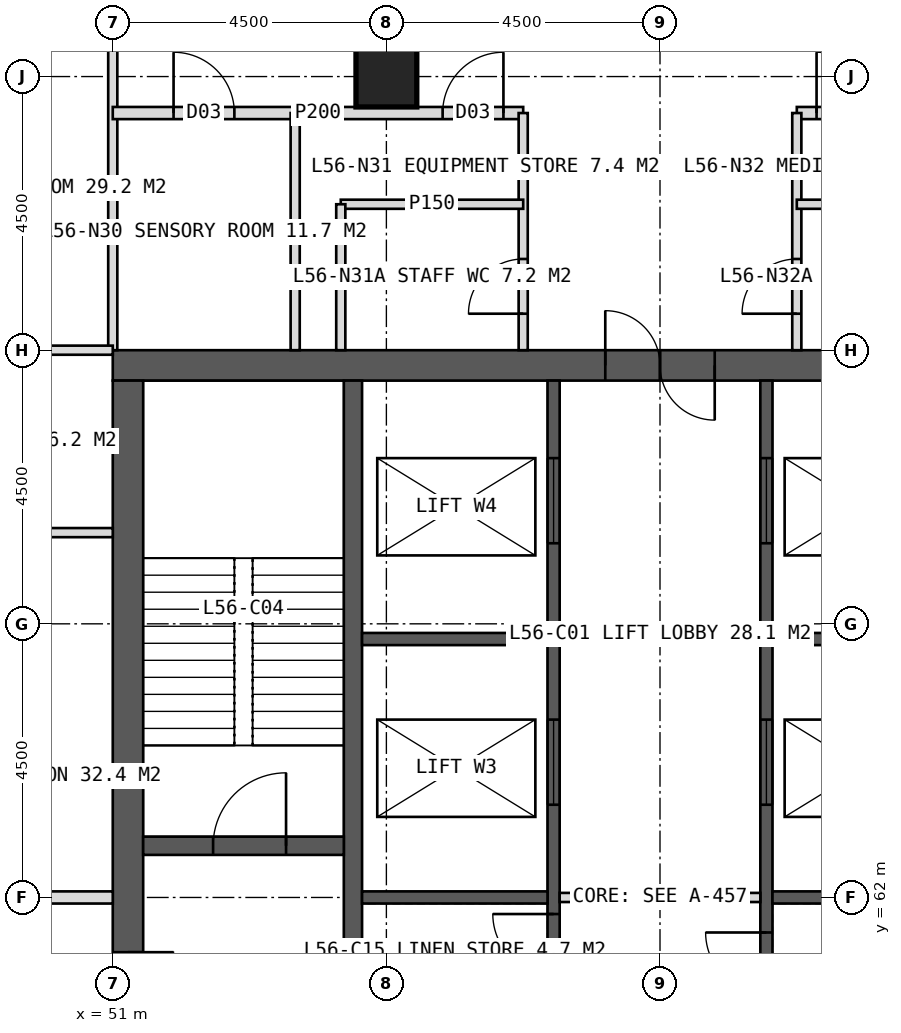
"""IFC4 building model, lengths in metres.
Left out: names, types, materials, properties, quantities, classifications, styles, units other than length and angle.
Written with IfcOpenShell. Run it as: python <this file> out.ifc"""

import sys

from ifc_helpers import new_model, si_unit, direction, frame, frame_2d, origin, origin_2d, place, context, subcontext, project, spatial, rectangle, hollow_rectangle, extrude, element, fill, save


model = new_model("IFC4")
c1 = context("Model", 3, precision=1e-05, world=origin(), true_north=direction((0.0, 1.0)))
c2 = subcontext(c1, "Body", "Model", "MODEL_VIEW")
j1 = project(units=[si_unit("LENGTHUNIT", "METRE"), si_unit("PLANEANGLEUNIT", "RADIAN")], contexts=[c1])
p1 = place(None, origin())
s1 = spatial("IfcSite", under=j1, at=p1, CompositionType="ELEMENT")
p2 = place(p1, origin())
s2 = spatial("IfcBuilding", under=s1, at=p2, CompositionType="ELEMENT")
p3 = place(p2, frame((0.0, 0.0, 233.0)))
s3 = spatial("IfcBuildingStorey", under=s2, at=p3, CompositionType="ELEMENT", Elevation=233.0)
p4 = place(p3, frame((51.0, 70.75, 0.0), z_axis=(0.0, 0.0, 1.0), x_axis=(1.0, 0.0, 0.0)))
e1 = element("IfcWall", 1, at=p4, inside=s3, PredefinedType="SHEAR", context=c2, shape_type="SweptSolid", body=[
    extrude(rectangle(XDim=18.0, YDim=0.5, at=frame_2d((9.0, 0.0))), origin(), (0.0, 0.0, 1.0), 4.0),
])
p5 = place(p4, frame((8.1, 0.0, 0.0)))
e2 = element("IfcOpeningElement", 2, at=p5, cuts=e1, PredefinedType="OPENING", context=c2, shape_type="SweptSolid", body=[
    extrude(rectangle(XDim=1.8, YDim=2.2, at=frame_2d((0.9, 1.1))), frame((0.0, 0.26, 0.0), z_axis=(0.0, -1.0, 0.0), x_axis=(1.0, 0.0, 0.0)), (0.0, 0.0, 1.0), 0.52),
])
p6 = place(p3, frame((51.25, 53.5, 0.0), z_axis=(0.0, 0.0, 1.0), x_axis=(0.0, 1.0, 0.0)))
e3 = element("IfcWall", 3, at=p6, inside=s3, PredefinedType="SHEAR", context=c2, shape_type="SweptSolid", body=[
    extrude(rectangle(XDim=17.0, YDim=0.5, at=frame_2d((8.5, 0.0))), origin(), (0.0, 0.0, 1.0), 4.0),
])
p7 = place(p6, frame((6.1, 0.0, 0.0)))
e4 = element("IfcOpeningElement", 4, at=p7, cuts=e3, PredefinedType="OPENING", context=c2, shape_type="SweptSolid", body=[
    extrude(rectangle(XDim=1.5, YDim=2.2, at=frame_2d((0.75, 1.1))), frame((0.0, 0.26, 0.0), z_axis=(0.0, -1.0, 0.0), x_axis=(1.0, 0.0, 0.0)), (0.0, 0.0, 1.0), 0.52),
])
p8 = place(p3, frame((54.95, 53.5, 0.0), z_axis=(0.0, 0.0, 1.0), x_axis=(0.0, 1.0, 0.0)))
e5 = element("IfcWall", 5, at=p8, inside=s3, PredefinedType="SHEAR", context=c2, shape_type="SweptSolid", body=[
    extrude(rectangle(XDim=17.0, YDim=0.3, at=frame_2d((8.5, 0.0))), origin(), (0.0, 0.0, 1.0), 4.0),
])
p9 = place(p3, frame((58.25, 53.5, 0.0), z_axis=(0.0, 0.0, 1.0), x_axis=(0.0, 1.0, 0.0)))
e6 = element("IfcWall", 6, at=p9, inside=s3, PredefinedType="SHEAR", context=c2, shape_type="SweptSolid", body=[
    extrude(rectangle(XDim=17.0, YDim=0.2, at=frame_2d((8.5, 0.0))), origin(), (0.0, 0.0, 1.0), 4.0),
])
p10 = place(p9, frame((0.393, 0.0, 0.0)))
e7 = element("IfcOpeningElement", 7, at=p10, cuts=e6, PredefinedType="OPENING", context=c2, shape_type="SweptSolid", body=[
    extrude(rectangle(XDim=1.0, YDim=2.1, at=frame_2d((0.5, 1.05))), frame((0.0, 0.11, 0.0), z_axis=(0.0, -1.0, 0.0), x_axis=(1.0, 0.0, 0.0)), (0.0, 0.0, 1.0), 0.22),
])
p11 = place(p9, frame((2.542, 0.0, 0.0)))
e8 = element("IfcOpeningElement", 8, at=p11, cuts=e6, PredefinedType="OPENING", context=c2, shape_type="SweptSolid", body=[
    extrude(rectangle(XDim=1.0, YDim=2.1, at=frame_2d((0.5, 1.05))), frame((0.0, 0.11, 0.0), z_axis=(0.0, -1.0, 0.0), x_axis=(1.0, 0.0, 0.0)), (0.0, 0.0, 1.0), 0.22),
])
p12 = place(p9, frame((5.127, 0.0, 0.0)))
e9 = element("IfcOpeningElement", 9, at=p12, cuts=e6, PredefinedType="OPENING", context=c2, shape_type="SweptSolid", body=[
    extrude(rectangle(XDim=1.0, YDim=2.1, at=frame_2d((0.5, 1.05))), frame((0.0, 0.11, 0.0), z_axis=(0.0, -1.0, 0.0), x_axis=(1.0, 0.0, 0.0)), (0.0, 0.0, 1.0), 0.22),
])
p13 = place(p9, frame((7.228, 0.0, 0.0)))
e10 = element("IfcOpeningElement", 10, at=p13, cuts=e6, PredefinedType="OPENING", context=c2, shape_type="SweptSolid", body=[
    extrude(rectangle(XDim=1.0, YDim=2.1, at=frame_2d((0.5, 1.05))), frame((0.0, 0.11, 0.0), z_axis=(0.0, -1.0, 0.0), x_axis=(1.0, 0.0, 0.0)), (0.0, 0.0, 1.0), 0.22),
])
p14 = place(p9, frame((10.025, 0.0, 0.0)))
e11 = element("IfcOpeningElement", 11, at=p14, cuts=e6, PredefinedType="OPENING", context=c2, shape_type="SweptSolid", body=[
    extrude(rectangle(XDim=1.4, YDim=2.2, at=frame_2d((0.7, 1.1))), frame((0.0, 0.11, 0.0), z_axis=(0.0, -1.0, 0.0), x_axis=(1.0, 0.0, 0.0)), (0.0, 0.0, 1.0), 0.22),
])
p15 = place(p9, frame((14.325, 0.0, 0.0)))
e12 = element("IfcOpeningElement", 12, at=p15, cuts=e6, PredefinedType="OPENING", context=c2, shape_type="SweptSolid", body=[
    extrude(rectangle(XDim=1.4, YDim=2.2, at=frame_2d((0.7, 1.1))), frame((0.0, 0.11, 0.0), z_axis=(0.0, -1.0, 0.0), x_axis=(1.0, 0.0, 0.0)), (0.0, 0.0, 1.0), 0.22),
])
p16 = place(p3, frame((61.75, 53.5, 0.0), z_axis=(0.0, 0.0, 1.0), x_axis=(0.0, 1.0, 0.0)))
e13 = element("IfcWall", 13, at=p16, inside=s3, PredefinedType="SHEAR", context=c2, shape_type="SweptSolid", body=[
    extrude(rectangle(XDim=17.0, YDim=0.2, at=frame_2d((8.5, 0.0))), origin(), (0.0, 0.0, 1.0), 4.0),
])
p17 = place(p16, frame((0.6, 0.0, 0.0)))
e14 = element("IfcOpeningElement", 14, at=p17, cuts=e13, PredefinedType="OPENING", context=c2, shape_type="SweptSolid", body=[
    extrude(rectangle(XDim=1.0, YDim=2.1, at=frame_2d((0.5, 1.05))), frame((0.0, 0.11, 0.0), z_axis=(0.0, -1.0, 0.0), x_axis=(1.0, 0.0, 0.0)), (0.0, 0.0, 1.0), 0.22),
])
p18 = place(p16, frame((2.75, 0.0, 0.0)))
e15 = element("IfcOpeningElement", 15, at=p18, cuts=e13, PredefinedType="OPENING", context=c2, shape_type="SweptSolid", body=[
    extrude(rectangle(XDim=1.0, YDim=2.1, at=frame_2d((0.5, 1.05))), frame((0.0, 0.11, 0.0), z_axis=(0.0, -1.0, 0.0), x_axis=(1.0, 0.0, 0.0)), (0.0, 0.0, 1.0), 0.22),
])
p19 = place(p16, frame((4.824, 0.0, 0.0)))
e16 = element("IfcOpeningElement", 16, at=p19, cuts=e13, PredefinedType="OPENING", context=c2, shape_type="SweptSolid", body=[
    extrude(rectangle(XDim=1.0, YDim=2.1, at=frame_2d((0.5, 1.05))), frame((0.0, 0.11, 0.0), z_axis=(0.0, -1.0, 0.0), x_axis=(1.0, 0.0, 0.0)), (0.0, 0.0, 1.0), 0.22),
])
p20 = place(p16, frame((6.924, 0.0, 0.0)))
e17 = element("IfcOpeningElement", 17, at=p20, cuts=e13, PredefinedType="OPENING", context=c2, shape_type="SweptSolid", body=[
    extrude(rectangle(XDim=1.0, YDim=2.1, at=frame_2d((0.5, 1.05))), frame((0.0, 0.11, 0.0), z_axis=(0.0, -1.0, 0.0), x_axis=(1.0, 0.0, 0.0)), (0.0, 0.0, 1.0), 0.22),
])
p21 = place(p16, frame((10.025, 0.0, 0.0)))
e18 = element("IfcOpeningElement", 18, at=p21, cuts=e13, PredefinedType="OPENING", context=c2, shape_type="SweptSolid", body=[
    extrude(rectangle(XDim=1.4, YDim=2.2, at=frame_2d((0.7, 1.1))), frame((0.0, 0.11, 0.0), z_axis=(0.0, -1.0, 0.0), x_axis=(1.0, 0.0, 0.0)), (0.0, 0.0, 1.0), 0.22),
])
p22 = place(p16, frame((14.325, 0.0, 0.0)))
e19 = element("IfcOpeningElement", 19, at=p22, cuts=e13, PredefinedType="OPENING", context=c2, shape_type="SweptSolid", body=[
    extrude(rectangle(XDim=1.4, YDim=2.2, at=frame_2d((0.7, 1.1))), frame((0.0, 0.11, 0.0), z_axis=(0.0, -1.0, 0.0), x_axis=(1.0, 0.0, 0.0)), (0.0, 0.0, 1.0), 0.22),
])
for number, where, z_axis, x_axis in (
    (20, (55.1, 62.0, 0.0), (0.0, 0.0, 1.0), (1.0, 0.0, 0.0)),
    (21, (61.85, 62.0, 0.0), (0.0, 0.0, 1.0), (1.0, 0.0, 0.0)),
    (22, (55.1, 66.25, 0.0), (0.0, 0.0, 1.0), (1.0, 0.0, 0.0)),
    (23, (61.85, 66.25, 0.0), (0.0, 0.0, 1.0), (1.0, 0.0, 0.0)),
):
    element("IfcWall", number, at=place(p3, frame(where, z_axis=z_axis, x_axis=x_axis)), inside=s3, PredefinedType="SHEAR", context=c2, shape_type="SweptSolid", body=[
        extrude(rectangle(XDim=3.05, YDim=0.2, at=frame_2d((1.525, 0.0))), origin(), (0.0, 0.0, 1.0), 4.0),
    ])
p23 = place(p3, frame((51.5, 62.85, 0.0), z_axis=(0.0, 0.0, 1.0), x_axis=(1.0, 0.0, 0.0)))
e24 = element("IfcWall", 24, at=p23, inside=s3, PredefinedType="SHEAR", context=c2, shape_type="SweptSolid", body=[
    extrude(rectangle(XDim=3.3, YDim=0.3, at=frame_2d((1.65, 0.0))), origin(), (0.0, 0.0, 1.0), 4.0),
])
p24 = place(p23, frame((1.15, 0.0, 0.0)))
e25 = element("IfcOpeningElement", 25, at=p24, cuts=e24, PredefinedType="OPENING", context=c2, shape_type="SweptSolid", body=[
    extrude(rectangle(XDim=1.2, YDim=2.1, at=frame_2d((0.6, 1.05))), frame((0.0, 0.16, 0.0), z_axis=(0.0, -1.0, 0.0), x_axis=(1.0, 0.0, 0.0)), (0.0, 0.0, 1.0), 0.32),
])
p25 = place(p3, frame((55.5, 75.5, 0.0), z_axis=(0.0, 0.0, 1.0), x_axis=(1.0, 0.0, 0.0)))
e26 = element("IfcColumn", 26, at=p25, inside=s3, PredefinedType="COLUMN", context=c2, shape_type="SweptSolid", body=[
    extrude(hollow_rectangle(XDim=1.0, YDim=1.0, WallThickness=0.1, at=origin_2d()), origin(), (0.0, 0.0, 1.0), 4.0),
])
p26 = place(p3, frame((51.0, 71.0, 0.0), z_axis=(0.0, 0.0, 1.0), x_axis=(0.0, 1.0, 0.0)))
e27 = element("IfcWall", 27, at=p26, inside=s3, PredefinedType="PARTITIONING", context=c2, shape_type="SweptSolid", body=[
    extrude(rectangle(XDim=5.4, YDim=0.15, at=frame_2d((2.7, 0.0))), origin(), (0.0, 0.0, 1.0), 3.75),
])
p27 = place(p3, frame((51.0, 74.9, 0.0), z_axis=(0.0, 0.0, 1.0), x_axis=(1.0, 0.0, 0.0)))
e28 = element("IfcWall", 28, at=p27, inside=s3, PredefinedType="PARTITIONING", context=c2, shape_type="SweptSolid", body=[
    extrude(rectangle(XDim=6.75, YDim=0.2, at=frame_2d((3.375, 0.0))), origin(), (0.0, 0.0, 1.0), 3.75),
])
p28 = place(p27, frame((1.0, 0.0, 0.0)))
e29 = element("IfcOpeningElement", 29, at=p28, cuts=e28, PredefinedType="OPENING", context=c2, shape_type="SweptSolid", body=[
    extrude(rectangle(XDim=1.0, YDim=2.1, at=frame_2d((0.5, 1.05))), frame((0.0, 0.11, 0.0), z_axis=(0.0, -1.0, 0.0), x_axis=(1.0, 0.0, 0.0)), (0.0, 0.0, 1.0), 0.22),
])
p29 = place(p27, frame((5.425, 0.0, 0.0)))
e30 = element("IfcOpeningElement", 30, at=p29, cuts=e28, PredefinedType="OPENING", context=c2, shape_type="SweptSolid", body=[
    extrude(rectangle(XDim=1.0, YDim=2.1, at=frame_2d((0.5, 1.05))), frame((0.0, 0.11, 0.0), z_axis=(0.0, -1.0, 0.0), x_axis=(1.0, 0.0, 0.0)), (0.0, 0.0, 1.0), 0.22),
])
p30 = place(p3, frame((62.25, 74.9, 0.0), z_axis=(0.0, 0.0, 1.0), x_axis=(1.0, 0.0, 0.0)))
e31 = element("IfcWall", 31, at=p30, inside=s3, PredefinedType="PARTITIONING", context=c2, shape_type="SweptSolid", body=[
    extrude(rectangle(XDim=6.75, YDim=0.2, at=frame_2d((3.375, 0.0))), origin(), (0.0, 0.0, 1.0), 3.75),
])
p31 = place(p30, frame((0.325, 0.0, 0.0)))
e32 = element("IfcOpeningElement", 32, at=p31, cuts=e31, PredefinedType="OPENING", context=c2, shape_type="SweptSolid", body=[
    extrude(rectangle(XDim=1.0, YDim=2.1, at=frame_2d((0.5, 1.05))), frame((0.0, 0.11, 0.0), z_axis=(0.0, -1.0, 0.0), x_axis=(1.0, 0.0, 0.0)), (0.0, 0.0, 1.0), 0.22),
])
p32 = place(p30, frame((5.5, 0.0, 0.0)))
e33 = element("IfcOpeningElement", 33, at=p32, cuts=e31, PredefinedType="OPENING", context=c2, shape_type="SweptSolid", body=[
    extrude(rectangle(XDim=1.0, YDim=2.1, at=frame_2d((0.5, 1.05))), frame((0.0, 0.11, 0.0), z_axis=(0.0, -1.0, 0.0), x_axis=(1.0, 0.0, 0.0)), (0.0, 0.0, 1.0), 0.22),
])
p33 = place(p3, frame((57.75, 71.0, 0.0), z_axis=(0.0, 0.0, 1.0), x_axis=(0.0, 1.0, 0.0)))
e34 = element("IfcWall", 34, at=p33, inside=s3, PredefinedType="PARTITIONING", context=c2, shape_type="SweptSolid", body=[
    extrude(rectangle(XDim=3.9, YDim=0.15, at=frame_2d((1.95, 0.0))), origin(), (0.0, 0.0, 1.0), 3.75),
])
p34 = place(p33, frame((0.6, 0.0, 0.0)))
e35 = element("IfcOpeningElement", 35, at=p34, cuts=e34, PredefinedType="OPENING", context=c2, shape_type="SweptSolid", body=[
    extrude(rectangle(XDim=0.9, YDim=2.1, at=frame_2d((0.45, 1.05))), frame((0.0, 0.085, 0.0), z_axis=(0.0, -1.0, 0.0), x_axis=(1.0, 0.0, 0.0)), (0.0, 0.0, 1.0), 0.17),
])
p35 = place(p3, frame((62.25, 71.0, 0.0), z_axis=(0.0, 0.0, 1.0), x_axis=(0.0, 1.0, 0.0)))
e36 = element("IfcWall", 36, at=p35, inside=s3, PredefinedType="PARTITIONING", context=c2, shape_type="SweptSolid", body=[
    extrude(rectangle(XDim=3.9, YDim=0.15, at=frame_2d((1.95, 0.0))), origin(), (0.0, 0.0, 1.0), 3.75),
])
p36 = place(p35, frame((0.6, 0.0, 0.0)))
e37 = element("IfcOpeningElement", 37, at=p36, cuts=e36, PredefinedType="OPENING", context=c2, shape_type="SweptSolid", body=[
    extrude(rectangle(XDim=0.9, YDim=2.1, at=frame_2d((0.45, 1.05))), frame((0.0, 0.085, 0.0), z_axis=(0.0, -1.0, 0.0), x_axis=(1.0, 0.0, 0.0)), (0.0, 0.0, 1.0), 0.17),
])
p37 = place(p3, frame((54.0, 71.0, 0.0), z_axis=(0.0, 0.0, 1.0), x_axis=(0.0, 1.0, 0.0)))
e38 = element("IfcWall", 38, at=p37, inside=s3, PredefinedType="PARTITIONING", context=c2, shape_type="SweptSolid", body=[
    extrude(rectangle(XDim=3.9, YDim=0.15, at=frame_2d((1.95, 0.0))), origin(), (0.0, 0.0, 1.0), 3.75),
])
p38 = place(p3, frame((54.75, 73.4, 0.0), z_axis=(0.0, 0.0, 1.0), x_axis=(1.0, 0.0, 0.0)))
e39 = element("IfcWall", 39, at=p38, inside=s3, PredefinedType="PARTITIONING", context=c2, shape_type="SweptSolid", body=[
    extrude(rectangle(XDim=3.0, YDim=0.15, at=frame_2d((1.5, 0.0))), origin(), (0.0, 0.0, 1.0), 3.75),
])
p39 = place(p3, frame((54.75, 71.0, 0.0), z_axis=(0.0, 0.0, 1.0), x_axis=(0.0, 1.0, 0.0)))
e40 = element("IfcWall", 40, at=p39, inside=s3, PredefinedType="PARTITIONING", context=c2, shape_type="SweptSolid", body=[
    extrude(rectangle(XDim=2.4, YDim=0.15, at=frame_2d((1.2, 0.0))), origin(), (0.0, 0.0, 1.0), 3.75),
])
p40 = place(p3, frame((62.25, 73.4, 0.0), z_axis=(0.0, 0.0, 1.0), x_axis=(1.0, 0.0, 0.0)))
e41 = element("IfcWall", 41, at=p40, inside=s3, PredefinedType="PARTITIONING", context=c2, shape_type="SweptSolid", body=[
    extrude(rectangle(XDim=3.0, YDim=0.15, at=frame_2d((1.5, 0.0))), origin(), (0.0, 0.0, 1.0), 3.75),
])
p41 = place(p3, frame((51.0, 62.0, 0.0), z_axis=(0.0, 0.0, 1.0), x_axis=(-1.0, 0.0, 0.0)))
e42 = element("IfcWall", 42, at=p41, inside=s3, PredefinedType="SOLIDWALL", context=c2, shape_type="SweptSolid", body=[
    extrude(rectangle(XDim=5.4, YDim=0.2, at=frame_2d((2.7, 0.0))), origin(), (0.0, 0.0, 1.0), 2.95),
])
for number, where, z_axis, x_axis in (
    (43, (51.0, 68.0, 0.0), (0.0, 0.0, 1.0), (-1.0, 0.0, 0.0)),
    (44, (51.0, 71.0, 0.0), (0.0, 0.0, 1.0), (-1.0, 0.0, 0.0)),
):
    element("IfcWall", number, at=place(p3, frame(where, z_axis=z_axis, x_axis=x_axis)), inside=s3, PredefinedType="PARTITIONING", context=c2, shape_type="SweptSolid", body=[
        extrude(rectangle(XDim=5.4, YDim=0.15, at=frame_2d((2.7, 0.0))), origin(), (0.0, 0.0, 1.0), 3.75),
    ])
p42 = place(p3, frame((58.35, 62.0, 0.0), z_axis=(0.0, 0.0, 1.0), x_axis=(1.0, 0.0, 0.0)))
e45 = element("IfcWall", 45, at=p42, inside=s3, PredefinedType="PARTITIONING", context=c2, shape_type="SweptSolid", body=[
    extrude(rectangle(XDim=3.3, YDim=0.15, at=frame_2d((1.65, 0.0))), origin(), (0.0, 0.0, 1.0), 3.75),
])
p43 = place(p28, origin())
e46 = element("IfcDoor", 46, at=p43, inside=s3, OperationType="SINGLE_SWING_LEFT", PredefinedType="DOOR", context=c2, shape_type="SweptSolid", body=[
    extrude(rectangle(XDim=1.0, YDim=2.1, at=frame_2d((0.5, 1.05))), frame((0.0, 0.025, 0.0), z_axis=(0.0, -1.0, 0.0), x_axis=(1.0, 0.0, 0.0)), (0.0, 0.0, 1.0), 0.05),
])
fill(e29, e46)
p44 = place(p34, origin())
e47 = element("IfcDoor", 47, at=p44, inside=s3, OperationType="SINGLE_SWING_LEFT", PredefinedType="DOOR", context=c2, shape_type="SweptSolid", body=[
    extrude(rectangle(XDim=0.9, YDim=2.1, at=frame_2d((0.45, 1.05))), frame((0.0, 0.025, 0.0), z_axis=(0.0, -1.0, 0.0), x_axis=(1.0, 0.0, 0.0)), (0.0, 0.0, 1.0), 0.05),
])
fill(e35, e47)
p45 = place(p29, origin())
e48 = element("IfcDoor", 48, at=p45, inside=s3, OperationType="SINGLE_SWING_RIGHT", PredefinedType="DOOR", context=c2, shape_type="SweptSolid", body=[
    extrude(rectangle(XDim=1.0, YDim=2.1, at=frame_2d((0.5, 1.05))), frame((0.0, 0.025, 0.0), z_axis=(0.0, -1.0, 0.0), x_axis=(1.0, 0.0, 0.0)), (0.0, 0.0, 1.0), 0.05),
])
fill(e30, e48)
p46 = place(p36, origin())
e49 = element("IfcDoor", 49, at=p46, inside=s3, OperationType="SINGLE_SWING_LEFT", PredefinedType="DOOR", context=c2, shape_type="SweptSolid", body=[
    extrude(rectangle(XDim=0.9, YDim=2.1, at=frame_2d((0.45, 1.05))), frame((0.0, 0.025, 0.0), z_axis=(0.0, -1.0, 0.0), x_axis=(1.0, 0.0, 0.0)), (0.0, 0.0, 1.0), 0.05),
])
fill(e37, e49)
p47 = place(p31, origin())
e50 = element("IfcDoor", 50, at=p47, inside=s3, OperationType="SINGLE_SWING_LEFT", PredefinedType="DOOR", context=c2, shape_type="SweptSolid", body=[
    extrude(rectangle(XDim=1.0, YDim=2.1, at=frame_2d((0.5, 1.05))), frame((0.0, 0.025, 0.0), z_axis=(0.0, -1.0, 0.0), x_axis=(1.0, 0.0, 0.0)), (0.0, 0.0, 1.0), 0.05),
])
fill(e32, e50)
p48 = place(p5, origin())
e51 = element("IfcDoor", 51, at=p48, inside=s3, OperationType="DOUBLE_DOOR_SINGLE_SWING", PredefinedType="DOOR", context=c2, shape_type="SweptSolid", body=[
    extrude(rectangle(XDim=1.8, YDim=2.2, at=frame_2d((0.9, 1.1))), frame((0.0, 0.025, 0.0), z_axis=(0.0, -1.0, 0.0), x_axis=(1.0, 0.0, 0.0)), (0.0, 0.0, 1.0), 0.05),
])
fill(e2, e51)
p49 = place(p7, origin())
e52 = element("IfcDoor", 52, at=p49, inside=s3, OperationType="DOUBLE_DOOR_SINGLE_SWING", PredefinedType="DOOR", context=c2, shape_type="SweptSolid", body=[
    extrude(rectangle(XDim=1.5, YDim=2.2, at=frame_2d((0.75, 1.1))), frame((0.0, 0.025, 0.0), z_axis=(0.0, -1.0, 0.0), x_axis=(1.0, 0.0, 0.0)), (0.0, 0.0, 1.0), 0.05),
])
fill(e4, e52)
p50 = place(p24, origin())
e53 = element("IfcDoor", 53, at=p50, inside=s3, OperationType="SINGLE_SWING_RIGHT", PredefinedType="DOOR", context=c2, shape_type="SweptSolid", body=[
    extrude(rectangle(XDim=1.2, YDim=2.1, at=frame_2d((0.6, 1.05))), frame((0.0, 0.025, 0.0), z_axis=(0.0, -1.0, 0.0), x_axis=(1.0, 0.0, 0.0)), (0.0, 0.0, 1.0), 0.05),
])
fill(e25, e53)
p51 = place(p13, origin())
e54 = element("IfcDoor", 54, at=p51, inside=s3, OperationType="SINGLE_SWING_RIGHT", PredefinedType="DOOR", context=c2, shape_type="SweptSolid", body=[
    extrude(rectangle(XDim=1.0, YDim=2.1, at=frame_2d((0.5, 1.05))), frame((0.0, 0.025, 0.0), z_axis=(0.0, -1.0, 0.0), x_axis=(1.0, 0.0, 0.0)), (0.0, 0.0, 1.0), 0.05),
])
fill(e10, e54)
p52 = place(p20, origin())
e55 = element("IfcDoor", 55, at=p52, inside=s3, OperationType="SINGLE_SWING_RIGHT", PredefinedType="DOOR", context=c2, shape_type="SweptSolid", body=[
    extrude(rectangle(XDim=1.0, YDim=2.1, at=frame_2d((0.5, 1.05))), frame((0.0, 0.025, 0.0), z_axis=(0.0, -1.0, 0.0), x_axis=(1.0, 0.0, 0.0)), (0.0, 0.0, 1.0), 0.05),
])
fill(e17, e55)
p53 = place(p14, origin())
e56 = element("IfcDoor", 56, at=p53, inside=s3, OperationType="SLIDING_TO_LEFT", PredefinedType="DOOR", context=c2, shape_type="SweptSolid", body=[
    extrude(rectangle(XDim=1.4, YDim=2.2, at=frame_2d((0.7, 1.1))), frame((0.0, 0.025, 0.0), z_axis=(0.0, -1.0, 0.0), x_axis=(1.0, 0.0, 0.0)), (0.0, 0.0, 1.0), 0.05),
])
fill(e11, e56)
p54 = place(p21, origin())
e57 = element("IfcDoor", 57, at=p54, inside=s3, OperationType="SLIDING_TO_LEFT", PredefinedType="DOOR", context=c2, shape_type="SweptSolid", body=[
    extrude(rectangle(XDim=1.4, YDim=2.2, at=frame_2d((0.7, 1.1))), frame((0.0, 0.025, 0.0), z_axis=(0.0, -1.0, 0.0), x_axis=(1.0, 0.0, 0.0)), (0.0, 0.0, 1.0), 0.05),
])
fill(e18, e57)
p55 = place(p15, origin())
e58 = element("IfcDoor", 58, at=p55, inside=s3, OperationType="SLIDING_TO_LEFT", PredefinedType="DOOR", context=c2, shape_type="SweptSolid", body=[
    extrude(rectangle(XDim=1.4, YDim=2.2, at=frame_2d((0.7, 1.1))), frame((0.0, 0.025, 0.0), z_axis=(0.0, -1.0, 0.0), x_axis=(1.0, 0.0, 0.0)), (0.0, 0.0, 1.0), 0.05),
])
fill(e12, e58)
p56 = place(p22, origin())
e59 = element("IfcDoor", 59, at=p56, inside=s3, OperationType="SLIDING_TO_LEFT", PredefinedType="DOOR", context=c2, shape_type="SweptSolid", body=[
    extrude(rectangle(XDim=1.4, YDim=2.2, at=frame_2d((0.7, 1.1))), frame((0.0, 0.025, 0.0), z_axis=(0.0, -1.0, 0.0), x_axis=(1.0, 0.0, 0.0)), (0.0, 0.0, 1.0), 0.05),
])
fill(e19, e59)
save(model, sys.argv[1])
